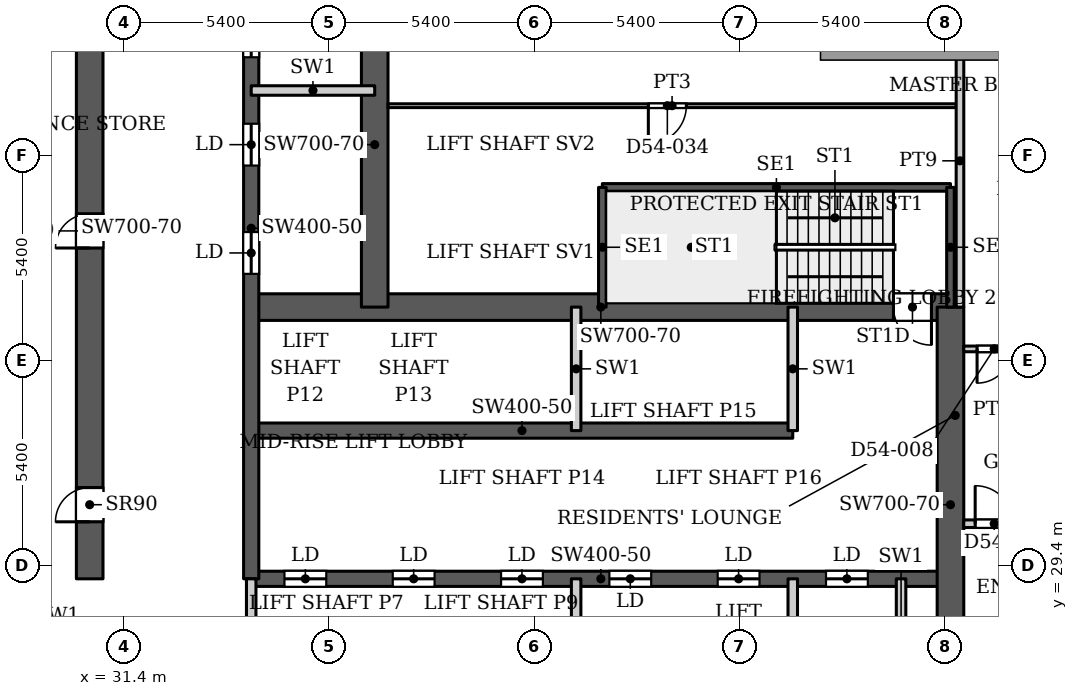
"""IFC4 building model, lengths in metres.
Left out: names, types, materials, properties, quantities, classifications, styles, units other than length and angle.
Written with IfcOpenShell. Run it as: python <this file> out.ifc"""

import sys

from ifc_helpers import new_model, si_unit, direction, frame, frame_2d, origin, place, context, subcontext, project, spatial, rectangle, extrude, source, transform, mapped, element, fill, save


model = new_model("IFC4")
c1 = context("Model", 3, precision=1e-05, world=origin(), true_north=direction((0.0, 1.0)))
c2 = subcontext(c1, "Body", "Model", "MODEL_VIEW")
j1 = project(units=[si_unit("LENGTHUNIT", "METRE"), si_unit("PLANEANGLEUNIT", "RADIAN")], contexts=[c1])
p1 = place(None, origin())
s1 = spatial("IfcSite", under=j1, at=p1, CompositionType="ELEMENT")
p2 = place(p1, origin())
s2 = spatial("IfcBuilding", under=s1, at=p2, CompositionType="ELEMENT")
p3 = place(p2, frame((0.0, 0.0, 231.8)))
s3 = spatial("IfcBuildingStorey", under=s2, at=p3, CompositionType="ELEMENT", Elevation=231.8)
p4 = place(p3, frame((34.75, 29.05, 0.0), z_axis=(0.0, 0.0, 1.0), x_axis=(1.0, 0.0, 0.0)))
e1 = element("IfcWall", 1, at=p4, inside=s3, PredefinedType="SHEAR", context=c2, shape_type="SweptSolid", body=[
    extrude(rectangle(XDim=18.4, YDim=0.4, at=frame_2d((9.2, 0.0))), origin(), (0.0, 0.0, 1.0), 3.9),
])
p5 = place(p4, frame((0.875, 0.0, 0.0)))
e2 = element("IfcOpeningElement", 2, at=p5, cuts=e1, PredefinedType="OPENING", context=c2, shape_type="SweptSolid", body=[
    extrude(rectangle(XDim=1.1, YDim=2.2, at=frame_2d((0.55, 1.1))), frame((0.0, 0.21, 0.0), z_axis=(0.0, -1.0, 0.0), x_axis=(1.0, 0.0, 0.0)), (0.0, 0.0, 1.0), 0.42),
])
p6 = place(p4, frame((3.725, 0.0, 0.0)))
e3 = element("IfcOpeningElement", 3, at=p6, cuts=e1, PredefinedType="OPENING", context=c2, shape_type="SweptSolid", body=[
    extrude(rectangle(XDim=1.1, YDim=2.2, at=frame_2d((0.55, 1.1))), frame((0.0, 0.21, 0.0), z_axis=(0.0, -1.0, 0.0), x_axis=(1.0, 0.0, 0.0)), (0.0, 0.0, 1.0), 0.42),
])
p7 = place(p4, frame((6.575, 0.0, 0.0)))
e4 = element("IfcOpeningElement", 4, at=p7, cuts=e1, PredefinedType="OPENING", context=c2, shape_type="SweptSolid", body=[
    extrude(rectangle(XDim=1.1, YDim=2.2, at=frame_2d((0.55, 1.1))), frame((0.0, 0.21, 0.0), z_axis=(0.0, -1.0, 0.0), x_axis=(1.0, 0.0, 0.0)), (0.0, 0.0, 1.0), 0.42),
])
p8 = place(p4, frame((9.425, 0.0, 0.0)))
e5 = element("IfcOpeningElement", 5, at=p8, cuts=e1, PredefinedType="OPENING", context=c2, shape_type="SweptSolid", body=[
    extrude(rectangle(XDim=1.1, YDim=2.2, at=frame_2d((0.55, 1.1))), frame((0.0, 0.21, 0.0), z_axis=(0.0, -1.0, 0.0), x_axis=(1.0, 0.0, 0.0)), (0.0, 0.0, 1.0), 0.42),
])
p9 = place(p4, frame((12.275, 0.0, 0.0)))
e6 = element("IfcOpeningElement", 6, at=p9, cuts=e1, PredefinedType="OPENING", context=c2, shape_type="SweptSolid", body=[
    extrude(rectangle(XDim=1.1, YDim=2.2, at=frame_2d((0.55, 1.1))), frame((0.0, 0.21, 0.0), z_axis=(0.0, -1.0, 0.0), x_axis=(1.0, 0.0, 0.0)), (0.0, 0.0, 1.0), 0.42),
])
p10 = place(p4, frame((15.125, 0.0, 0.0)))
e7 = element("IfcOpeningElement", 7, at=p10, cuts=e1, PredefinedType="OPENING", context=c2, shape_type="SweptSolid", body=[
    extrude(rectangle(XDim=1.1, YDim=2.2, at=frame_2d((0.55, 1.1))), frame((0.0, 0.21, 0.0), z_axis=(0.0, -1.0, 0.0), x_axis=(1.0, 0.0, 0.0)), (0.0, 0.0, 1.0), 0.42),
])
p11 = place(p3, frame((34.75, 32.95, 0.0), z_axis=(0.0, 0.0, 1.0), x_axis=(1.0, 0.0, 0.0)))
e8 = element("IfcWall", 8, at=p11, inside=s3, PredefinedType="SHEAR", context=c2, shape_type="SweptSolid", body=[
    extrude(rectangle(XDim=14.25, YDim=0.4, at=frame_2d((7.125, 0.0))), origin(), (0.0, 0.0, 1.0), 3.9),
])
p12 = place(p3, frame((34.75, 36.2, 0.0), z_axis=(0.0, 0.0, 1.0), x_axis=(1.0, 0.0, 0.0)))
e9 = element("IfcWall", 9, at=p12, inside=s3, PredefinedType="SHEAR", context=c2, shape_type="SweptSolid", body=[
    extrude(rectangle(XDim=18.4, YDim=0.7, at=frame_2d((9.2, 0.0))), origin(), (0.0, 0.0, 1.0), 3.9),
])
p13 = place(p12, frame((16.9, 0.0, 0.0)))
e10 = element("IfcOpeningElement", 10, at=p13, cuts=e9, PredefinedType="OPENING", context=c2, shape_type="SweptSolid", body=[
    extrude(rectangle(XDim=1.0, YDim=2.2, at=frame_2d((0.5, 1.1))), frame((0.0, 0.36, 0.0), z_axis=(0.0, -1.0, 0.0), x_axis=(1.0, 0.0, 0.0)), (0.0, 0.0, 1.0), 0.72),
])
p14 = place(p3, frame((34.75, 29.05, 0.0), z_axis=(0.0, 0.0, 1.0), x_axis=(0.0, 1.0, 0.0)))
e11 = element("IfcWall", 11, at=p14, inside=s3, PredefinedType="SHEAR", context=c2, shape_type="SweptSolid", body=[
    extrude(rectangle(XDim=18.45, YDim=0.4, at=frame_2d((9.225, 0.0))), origin(), (0.0, 0.0, 1.0), 3.9),
])
p15 = place(p14, frame((8.025, 0.0, 0.0)))
e12 = element("IfcOpeningElement", 12, at=p15, cuts=e11, PredefinedType="OPENING", context=c2, shape_type="SweptSolid", body=[
    extrude(rectangle(XDim=1.1, YDim=2.2, at=frame_2d((0.55, 1.1))), frame((0.0, 0.21, 0.0), z_axis=(0.0, -1.0, 0.0), x_axis=(1.0, 0.0, 0.0)), (0.0, 0.0, 1.0), 0.42),
])
p16 = place(p14, frame((10.875, 0.0, 0.0)))
e13 = element("IfcOpeningElement", 13, at=p16, cuts=e11, PredefinedType="OPENING", context=c2, shape_type="SweptSolid", body=[
    extrude(rectangle(XDim=1.1, YDim=2.2, at=frame_2d((0.55, 1.1))), frame((0.0, 0.21, 0.0), z_axis=(0.0, -1.0, 0.0), x_axis=(1.0, 0.0, 0.0)), (0.0, 0.0, 1.0), 0.42),
])
p17 = place(p14, frame((13.725, 0.0, 0.0)))
e14 = element("IfcOpeningElement", 14, at=p17, cuts=e11, PredefinedType="OPENING", context=c2, shape_type="SweptSolid", body=[
    extrude(rectangle(XDim=1.1, YDim=2.2, at=frame_2d((0.55, 1.1))), frame((0.0, 0.21, 0.0), z_axis=(0.0, -1.0, 0.0), x_axis=(1.0, 0.0, 0.0)), (0.0, 0.0, 1.0), 0.42),
])
p18 = place(p14, frame((15.95, 0.0, 0.0)))
e15 = element("IfcOpeningElement", 15, at=p18, cuts=e11, PredefinedType="OPENING", context=c2, shape_type="SweptSolid", body=[
    extrude(rectangle(XDim=1.1, YDim=2.2, at=frame_2d((0.55, 1.1))), frame((0.0, 0.21, 0.0), z_axis=(0.0, -1.0, 0.0), x_axis=(1.0, 0.0, 0.0)), (0.0, 0.0, 1.0), 0.42),
])
p19 = place(p3, frame((38.0, 36.2, 0.0), z_axis=(0.0, 0.0, 1.0), x_axis=(0.0, 1.0, 0.0)))
e16 = element("IfcWall", 16, at=p19, inside=s3, PredefinedType="SHEAR", context=c2, shape_type="SweptSolid", body=[
    extrude(rectangle(XDim=8.55, YDim=0.7, at=frame_2d((4.275, 0.0))), origin(), (0.0, 0.0, 1.0), 3.9),
])
p20 = place(p3, frame((30.5, 29.05, 0.0), z_axis=(0.0, 0.0, 1.0), x_axis=(0.0, 1.0, 0.0)))
e17 = element("IfcWall", 17, at=p20, inside=s3, PredefinedType="SHEAR", context=c2, shape_type="SweptSolid", body=[
    extrude(rectangle(XDim=18.45, YDim=0.7, at=frame_2d((9.225, 0.0))), origin(), (0.0, 0.0, 1.0), 3.9),
])
p21 = place(p20, frame((1.5, 0.0, 0.0)))
e18 = element("IfcOpeningElement", 18, at=p21, cuts=e17, PredefinedType="OPENING", context=c2, shape_type="SweptSolid", body=[
    extrude(rectangle(XDim=0.9, YDim=2.2, at=frame_2d((0.45, 1.1))), frame((0.0, 0.36, 0.0), z_axis=(0.0, -1.0, 0.0), x_axis=(1.0, 0.0, 0.0)), (0.0, 0.0, 1.0), 0.72),
])
p22 = place(p20, frame((8.705, 0.0, 0.0)))
e19 = element("IfcOpeningElement", 19, at=p22, cuts=e17, PredefinedType="OPENING", context=c2, shape_type="SweptSolid", body=[
    extrude(rectangle(XDim=0.9, YDim=2.2, at=frame_2d((0.45, 1.1))), frame((0.0, 0.36, 0.0), z_axis=(0.0, -1.0, 0.0), x_axis=(1.0, 0.0, 0.0)), (0.0, 0.0, 1.0), 0.72),
])
p23 = place(p3, frame((53.15, 25.8, 0.0), z_axis=(0.0, 0.0, 1.0), x_axis=(0.0, 1.0, 0.0)))
e20 = element("IfcWall", 20, at=p23, inside=s3, PredefinedType="SHEAR", context=c2, shape_type="SweptSolid", body=[
    extrude(rectangle(XDim=10.4, YDim=0.7, at=frame_2d((5.2, 0.0))), origin(), (0.0, 0.0, 1.0), 3.9),
])
p24 = place(p3, frame((29.712, 26.072, 0.0), z_axis=(0.0, 0.0, 1.0), x_axis=(-0.511028049012, 0.859564036662, 0.0)))
e21 = element("IfcWall", 21, at=p24, inside=s3, PredefinedType="SOLIDWALL", context=c2, shape_type="SweptSolid", body=[
    extrude(rectangle(XDim=4.634, YDim=0.25, at=frame_2d((2.317, 0.0))), origin(), (0.0, 0.0, 1.0), 3.217),
])
p25 = place(p3, frame((27.195, 31.969, 0.0), z_axis=(0.0, 0.0, 1.0), x_axis=(0.052555284099, 0.998618016117, 0.0)))
e22 = element("IfcWall", 22, at=p25, inside=s3, PredefinedType="SOLIDWALL", context=c2, shape_type="SweptSolid", body=[
    extrude(rectangle(XDim=61.38, YDim=0.25, at=frame_2d((30.69, 0.0))), origin(), (0.0, 0.0, 1.0), 3.75),
])
p26 = place(p3, frame((43.99, 39.35, 0.0), z_axis=(0.0, 0.0, 1.0), x_axis=(1.0, 0.0, 0.0)))
e23 = element("IfcWall", 23, at=p26, inside=s3, PredefinedType="SHEAR", context=c2, shape_type="SweptSolid", body=[
    extrude(rectangle(XDim=9.16, YDim=0.2, at=frame_2d((4.58, 0.0))), origin(), (0.0, 0.0, 1.0), 3.9),
])
for number, where, z_axis, x_axis in (
    (24, (43.99, 36.2, 0.0), (0.0, 0.0, 1.0), (0.0, 1.0, 0.0)),
    (25, (53.15, 36.2, 0.0), (0.0, 0.0, 1.0), (0.0, 1.0, 0.0)),
):
    element("IfcWall", number, at=place(p3, frame(where, z_axis=z_axis, x_axis=x_axis)), inside=s3, PredefinedType="SHEAR", context=c2, shape_type="SweptSolid", body=[
        extrude(rectangle(XDim=3.15, YDim=0.2, at=frame_2d((1.575, 0.0))), origin(), (0.0, 0.0, 1.0), 3.9),
    ])
for number, where, z_axis, x_axis in (
    (26, (34.75, 25.8, 0.0), (0.0, 0.0, 1.0), (0.0, 1.0, 0.0)),
    (27, (43.3, 25.8, 0.0), (0.0, 0.0, 1.0), (0.0, 1.0, 0.0)),
    (28, (43.3, 32.95, 0.0), (0.0, 0.0, 1.0), (0.0, 1.0, 0.0)),
    (29, (49.0, 25.8, 0.0), (0.0, 0.0, 1.0), (0.0, 1.0, 0.0)),
    (30, (49.0, 32.95, 0.0), (0.0, 0.0, 1.0), (0.0, 1.0, 0.0)),
    (31, (51.85, 25.8, 0.0), (0.0, 0.0, 1.0), (0.0, 1.0, 0.0)),
    (32, (34.75, 41.9, 0.0), (0.0, 0.0, 1.0), (1.0, 0.0, 0.0)),
):
    element("IfcWall", number, at=place(p3, frame(where, z_axis=z_axis, x_axis=x_axis)), inside=s3, PredefinedType="PARTITIONING", context=c2, shape_type="SweptSolid", body=[
        extrude(rectangle(XDim=3.25, YDim=0.25, at=frame_2d((1.625, 0.0))), origin(), (0.0, 0.0, 1.0), 3.9),
    ])
p27 = place(p3, frame((38.349, 41.5, 0.0), z_axis=(0.0, 0.0, 1.0), x_axis=(1.0, 0.0, 0.0)))
e33 = element("IfcWall", 33, at=p27, inside=s3, PredefinedType="PARTITIONING", context=c2, shape_type="SweptSolid", body=[
    extrude(rectangle(XDim=14.951, YDim=0.1, at=frame_2d((7.476, 0.0))), origin(), (0.0, 0.0, 1.0), 3.6),
])
p28 = place(p27, frame((6.851, 0.0, 0.0)))
e34 = element("IfcOpeningElement", 34, at=p28, cuts=e33, PredefinedType="OPENING", context=c2, shape_type="SweptSolid", body=[
    extrude(rectangle(XDim=1.0, YDim=2.1, at=frame_2d((0.5, 1.05))), frame((0.0, 0.06, 0.0), z_axis=(0.0, -1.0, 0.0), x_axis=(1.0, 0.0, 0.0)), (0.0, 0.0, 1.0), 0.12),
])
p29 = place(p3, frame((53.4, 36.199, 0.0), z_axis=(0.0, 0.0, 1.0), x_axis=(0.0, 1.0, 0.0)))
e35 = element("IfcWall", 35, at=p29, inside=s3, PredefinedType="PARTITIONING", context=c2, shape_type="SweptSolid", body=[
    extrude(rectangle(XDim=7.701, YDim=0.2, at=frame_2d((3.851, 0.0))), origin(), (0.0, 0.0, 1.0), 3.6),
])
p30 = place(p3, frame((53.499, 30.5, 0.0), z_axis=(0.0, 0.0, 1.0), x_axis=(1.0, 0.0, 0.0)))
e36 = element("IfcWall", 36, at=p30, inside=s3, PredefinedType="PARTITIONING", context=c2, shape_type="SweptSolid", body=[
    extrude(rectangle(XDim=28.401, YDim=0.2, at=frame_2d((14.2, 0.0))), origin(), (0.0, 0.0, 1.0), 3.6),
])
p31 = place(p30, frame((0.301, 0.0, 0.0)))
e37 = element("IfcOpeningElement", 37, at=p31, cuts=e36, PredefinedType="OPENING", context=c2, shape_type="SweptSolid", body=[
    extrude(rectangle(XDim=1.0, YDim=2.1, at=frame_2d((0.5, 1.05))), frame((0.0, 0.11, 0.0), z_axis=(0.0, -1.0, 0.0), x_axis=(1.0, 0.0, 0.0)), (0.0, 0.0, 1.0), 0.22),
])
p32 = place(p30, frame((18.151, 0.0, 0.0)))
e38 = element("IfcOpeningElement", 38, at=p32, cuts=e36, PredefinedType="OPENING", context=c2, shape_type="SweptSolid", body=[
    extrude(rectangle(XDim=1.0, YDim=2.1, at=frame_2d((0.5, 1.05))), frame((0.0, 0.11, 0.0), z_axis=(0.0, -1.0, 0.0), x_axis=(1.0, 0.0, 0.0)), (0.0, 0.0, 1.0), 0.22),
])
p33 = place(p30, frame((25.801, 0.0, 0.0)))
e39 = element("IfcOpeningElement", 39, at=p33, cuts=e36, PredefinedType="OPENING", context=c2, shape_type="SweptSolid", body=[
    extrude(rectangle(XDim=1.0, YDim=2.1, at=frame_2d((0.5, 1.05))), frame((0.0, 0.11, 0.0), z_axis=(0.0, -1.0, 0.0), x_axis=(1.0, 0.0, 0.0)), (0.0, 0.0, 1.0), 0.22),
])
p34 = place(p3, frame((53.499, 35.1, 0.0), z_axis=(0.0, 0.0, 1.0), x_axis=(1.0, 0.0, 0.0)))
e40 = element("IfcWall", 40, at=p34, inside=s3, PredefinedType="PARTITIONING", context=c2, shape_type="SweptSolid", body=[
    extrude(rectangle(XDim=11.501, YDim=0.15, at=frame_2d((5.75, 0.0))), origin(), (0.0, 0.0, 1.0), 3.6),
])
p35 = place(p34, frame((5.001, 0.0, 0.0)))
e41 = element("IfcOpeningElement", 41, at=p35, cuts=e40, PredefinedType="OPENING", context=c2, shape_type="SweptSolid", body=[
    extrude(rectangle(XDim=0.9, YDim=2.1, at=frame_2d((0.45, 1.05))), frame((0.0, 0.085, 0.0), z_axis=(0.0, -1.0, 0.0), x_axis=(1.0, 0.0, 0.0)), (0.0, 0.0, 1.0), 0.17),
])
p36 = place(p34, frame((8.851, 0.0, 0.0)))
e42 = element("IfcOpeningElement", 42, at=p36, cuts=e40, PredefinedType="OPENING", context=c2, shape_type="SweptSolid", body=[
    extrude(rectangle(XDim=1.0, YDim=2.1, at=frame_2d((0.5, 1.05))), frame((0.0, 0.085, 0.0), z_axis=(0.0, -1.0, 0.0), x_axis=(1.0, 0.0, 0.0)), (0.0, 0.0, 1.0), 0.17),
])
p37 = place(p34, frame((0.351, 0.0, 0.0)))
e43 = element("IfcOpeningElement", 43, at=p37, cuts=e40, PredefinedType="OPENING", context=c2, shape_type="SweptSolid", body=[
    extrude(rectangle(XDim=0.9, YDim=2.1, at=frame_2d((0.45, 1.05))), frame((0.0, 0.085, 0.0), z_axis=(0.0, -1.0, 0.0), x_axis=(1.0, 0.0, 0.0)), (0.0, 0.0, 1.0), 0.17),
])
m1 = source(origin(), c2, "Body", "SweptSolid", [
    extrude(rectangle(XDim=1.1, YDim=2.2, at=frame_2d((0.55, 1.1))), frame((0.0, 0.025, 0.0), z_axis=(0.0, -1.0, 0.0), x_axis=(1.0, 0.0, 0.0)), (0.0, 0.0, 1.0), 0.05),
])
p38 = place(p5, origin())
e44 = element("IfcDoor", 44, at=p38, inside=s3, OperationType="SLIDING_TO_LEFT", PredefinedType="DOOR", context=c2, shape_type="MappedRepresentation", body=[
    mapped(m1, transform((0.0, 0.0, 0.0), x_axis=(1.0, 0.0, 0.0), y_axis=(0.0, 1.0, 0.0), z_axis=(0.0, 0.0, 1.0), scale=1.0)),
])
fill(e2, e44)
p39 = place(p6, origin())
e45 = element("IfcDoor", 45, at=p39, inside=s3, OperationType="SLIDING_TO_LEFT", PredefinedType="DOOR", context=c2, shape_type="MappedRepresentation", body=[
    mapped(m1, transform((0.0, 0.0, 0.0), x_axis=(1.0, 0.0, 0.0), y_axis=(0.0, 1.0, 0.0), z_axis=(0.0, 0.0, 1.0), scale=1.0)),
])
fill(e3, e45)
p40 = place(p7, origin())
e46 = element("IfcDoor", 46, at=p40, inside=s3, OperationType="SLIDING_TO_LEFT", PredefinedType="DOOR", context=c2, shape_type="MappedRepresentation", body=[
    mapped(m1, transform((0.0, 0.0, 0.0), x_axis=(1.0, 0.0, 0.0), y_axis=(0.0, 1.0, 0.0), z_axis=(0.0, 0.0, 1.0), scale=1.0)),
])
fill(e4, e46)
p41 = place(p8, origin())
e47 = element("IfcDoor", 47, at=p41, inside=s3, OperationType="SLIDING_TO_LEFT", PredefinedType="DOOR", context=c2, shape_type="MappedRepresentation", body=[
    mapped(m1, transform((0.0, 0.0, 0.0), x_axis=(1.0, 0.0, 0.0), y_axis=(0.0, 1.0, 0.0), z_axis=(0.0, 0.0, 1.0), scale=1.0)),
])
fill(e5, e47)
p42 = place(p9, origin())
e48 = element("IfcDoor", 48, at=p42, inside=s3, OperationType="SLIDING_TO_LEFT", PredefinedType="DOOR", context=c2, shape_type="MappedRepresentation", body=[
    mapped(m1, transform((0.0, 0.0, 0.0), x_axis=(1.0, 0.0, 0.0), y_axis=(0.0, 1.0, 0.0), z_axis=(0.0, 0.0, 1.0), scale=1.0)),
])
fill(e6, e48)
p43 = place(p15, origin())
e49 = element("IfcDoor", 49, at=p43, inside=s3, OperationType="SLIDING_TO_LEFT", PredefinedType="DOOR", context=c2, shape_type="MappedRepresentation", body=[
    mapped(m1, transform((0.0, 0.0, 0.0), x_axis=(1.0, 0.0, 0.0), y_axis=(0.0, 1.0, 0.0), z_axis=(0.0, 0.0, 1.0), scale=1.0)),
])
fill(e12, e49)
p44 = place(p16, origin())
e50 = element("IfcDoor", 50, at=p44, inside=s3, OperationType="SLIDING_TO_LEFT", PredefinedType="DOOR", context=c2, shape_type="MappedRepresentation", body=[
    mapped(m1, transform((0.0, 0.0, 0.0), x_axis=(1.0, 0.0, 0.0), y_axis=(0.0, 1.0, 0.0), z_axis=(0.0, 0.0, 1.0), scale=1.0)),
])
fill(e13, e50)
p45 = place(p17, origin())
e51 = element("IfcDoor", 51, at=p45, inside=s3, OperationType="SLIDING_TO_LEFT", PredefinedType="DOOR", context=c2, shape_type="MappedRepresentation", body=[
    mapped(m1, transform((0.0, 0.0, 0.0), x_axis=(1.0, 0.0, 0.0), y_axis=(0.0, 1.0, 0.0), z_axis=(0.0, 0.0, 1.0), scale=1.0)),
])
fill(e14, e51)
p46 = place(p10, origin())
e52 = element("IfcDoor", 52, at=p46, inside=s3, OperationType="SLIDING_TO_LEFT", PredefinedType="DOOR", context=c2, shape_type="MappedRepresentation", body=[
    mapped(m1, transform((0.0, 0.0, 0.0), x_axis=(1.0, 0.0, 0.0), y_axis=(0.0, 1.0, 0.0), z_axis=(0.0, 0.0, 1.0), scale=1.0)),
])
fill(e7, e52)
m2 = source(origin(), c2, "Body", "SweptSolid", [
    extrude(rectangle(XDim=0.9, YDim=2.2, at=frame_2d((0.45, 1.1))), frame((0.0, 0.025, 0.0), z_axis=(0.0, -1.0, 0.0), x_axis=(1.0, 0.0, 0.0)), (0.0, 0.0, 1.0), 0.05),
])
p47 = place(p21, origin())
e53 = element("IfcDoor", 53, at=p47, inside=s3, OperationType="SINGLE_SWING_LEFT", PredefinedType="DOOR", context=c2, shape_type="MappedRepresentation", body=[
    mapped(m2, transform((0.0, 0.0, 0.0), x_axis=(1.0, 0.0, 0.0), y_axis=(0.0, 1.0, 0.0), z_axis=(0.0, 0.0, 1.0), scale=1.0)),
])
fill(e18, e53)
p48 = place(p22, origin())
e54 = element("IfcDoor", 54, at=p48, inside=s3, OperationType="SINGLE_SWING_LEFT", PredefinedType="DOOR", context=c2, shape_type="MappedRepresentation", body=[
    mapped(m2, transform((0.0, 0.0, 0.0), x_axis=(1.0, 0.0, 0.0), y_axis=(0.0, 1.0, 0.0), z_axis=(0.0, 0.0, 1.0), scale=1.0)),
])
fill(e19, e54)
m3 = source(origin(), c2, "Body", "SweptSolid", [
    extrude(rectangle(XDim=1.0, YDim=2.2, at=frame_2d((0.5, 1.1))), frame((0.0, 0.025, 0.0), z_axis=(0.0, -1.0, 0.0), x_axis=(1.0, 0.0, 0.0)), (0.0, 0.0, 1.0), 0.05),
])
p49 = place(p13, origin())
e55 = element("IfcDoor", 55, at=p49, inside=s3, OperationType="SINGLE_SWING_RIGHT", PredefinedType="DOOR", context=c2, shape_type="MappedRepresentation", body=[
    mapped(m3, transform((0.0, 0.0, 0.0), x_axis=(1.0, 0.0, 0.0), y_axis=(0.0, 1.0, 0.0), z_axis=(0.0, 0.0, 1.0), scale=1.0)),
])
fill(e10, e55)
m4 = source(origin(), c2, "Body", "SweptSolid", [
    extrude(rectangle(XDim=1.0, YDim=2.1, at=frame_2d((0.5, 1.05))), frame((0.0, 0.025, 0.0), z_axis=(0.0, -1.0, 0.0), x_axis=(1.0, 0.0, 0.0)), (0.0, 0.0, 1.0), 0.05),
])
p50 = place(p31, origin())
e56 = element("IfcDoor", 56, at=p50, inside=s3, OperationType="SINGLE_SWING_LEFT", PredefinedType="DOOR", context=c2, shape_type="MappedRepresentation", body=[
    mapped(m4, transform((0.0, 0.0, 0.0), x_axis=(1.0, 0.0, 0.0), y_axis=(0.0, 1.0, 0.0), z_axis=(0.0, 0.0, 1.0), scale=1.0)),
])
fill(e37, e56)
m5 = source(origin(), c2, "Body", "SweptSolid", [
    extrude(rectangle(XDim=0.9, YDim=2.1, at=frame_2d((0.45, 1.05))), frame((0.0, 0.025, 0.0), z_axis=(0.0, -1.0, 0.0), x_axis=(1.0, 0.0, 0.0)), (0.0, 0.0, 1.0), 0.05),
])
p51 = place(p37, origin())
e57 = element("IfcDoor", 57, at=p51, inside=s3, OperationType="SINGLE_SWING_RIGHT", PredefinedType="DOOR", context=c2, shape_type="MappedRepresentation", body=[
    mapped(m5, transform((0.0, 0.0, 0.0), x_axis=(1.0, 0.0, 0.0), y_axis=(0.0, 1.0, 0.0), z_axis=(0.0, 0.0, 1.0), scale=1.0)),
])
fill(e43, e57)
m6 = source(origin(), c2, "Body", "SweptSolid", [
    extrude(rectangle(XDim=1.0, YDim=2.1, at=frame_2d((0.5, 1.05))), frame((0.0, 0.025, 0.0), z_axis=(0.0, -1.0, 0.0), x_axis=(1.0, 0.0, 0.0)), (0.0, 0.0, 1.0), 0.05),
])
p52 = place(p28, origin())
e58 = element("IfcDoor", 58, at=p52, inside=s3, OperationType="SINGLE_SWING_RIGHT", PredefinedType="DOOR", context=c2, shape_type="MappedRepresentation", body=[
    mapped(m6, transform((0.0, 0.0, 0.0), x_axis=(1.0, 0.0, 0.0), y_axis=(0.0, 1.0, 0.0), z_axis=(0.0, 0.0, 1.0), scale=1.0)),
])
fill(e34, e58)
save(model, sys.argv[1])
